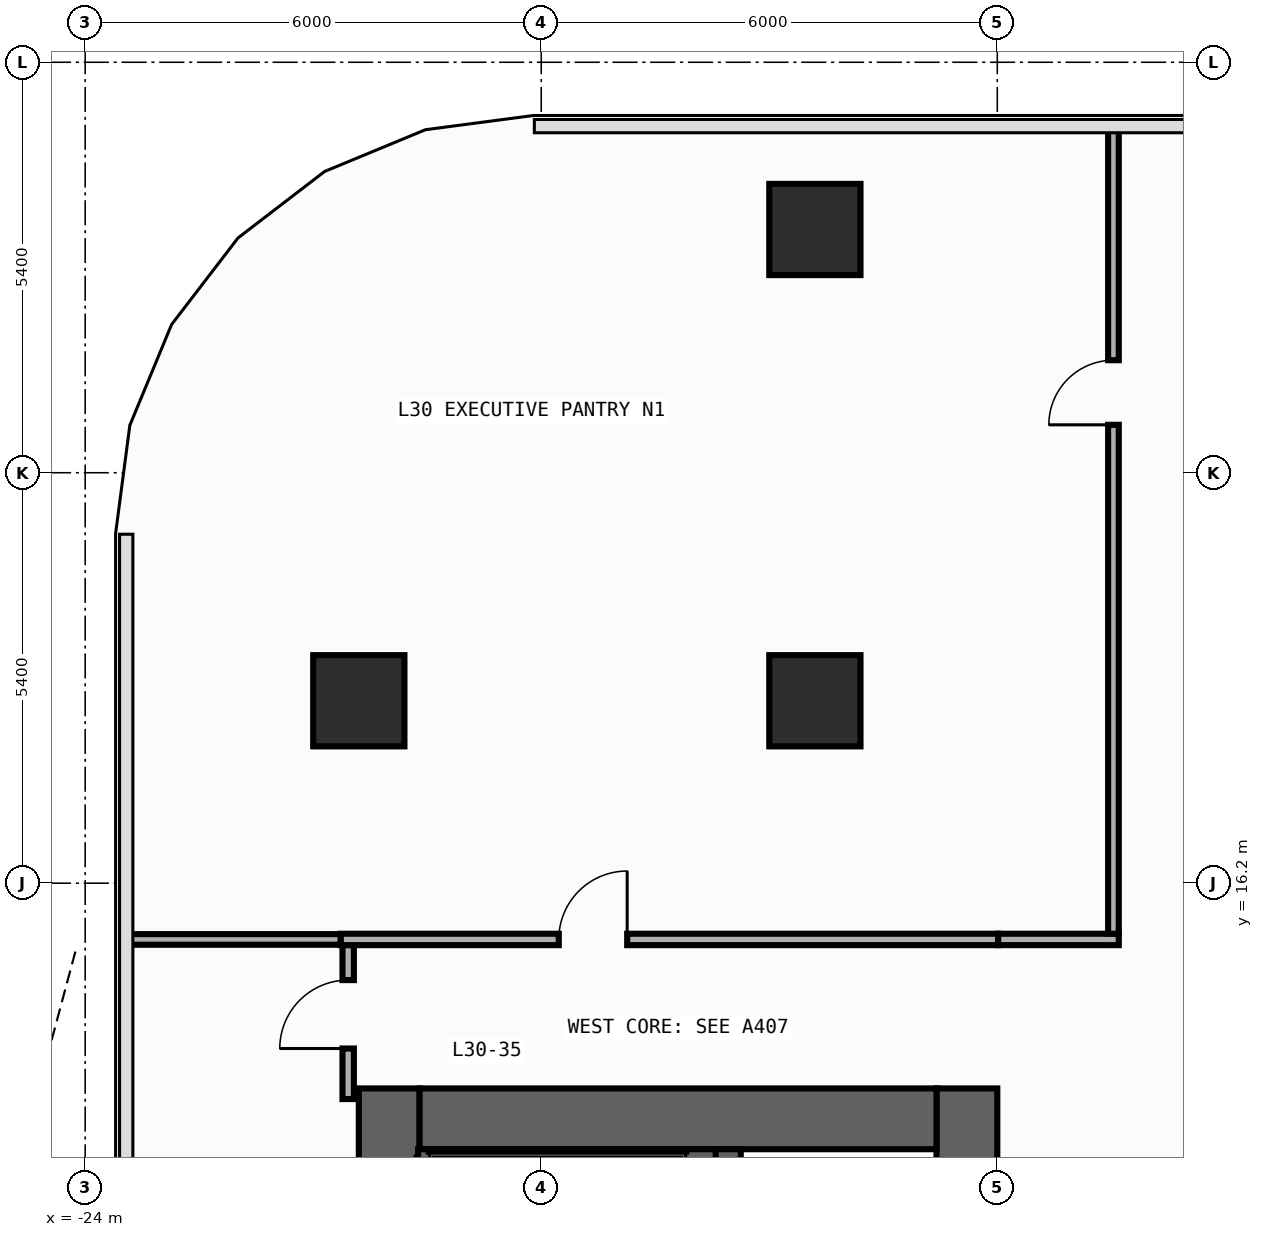
"""IFC4 building model, lengths in metres.
Left out: names, types, materials, properties, quantities, classifications, styles, units other than length and angle.
Written with IfcOpenShell. Run it as: python <this file> out.ifc"""

import sys

from ifc_helpers import new_model, si_unit, direction, frame, frame_2d, origin, origin_2d, place, context, subcontext, project, spatial, rectangle, extrude, element, fill, save


model = new_model("IFC4")
c1 = context("Model", 3, precision=1e-05, world=origin(), true_north=direction((0.0, 1.0)))
c2 = subcontext(c1, "Body", "Model", "MODEL_VIEW")
j1 = project(units=[si_unit("LENGTHUNIT", "METRE"), si_unit("PLANEANGLEUNIT", "RADIAN")], contexts=[c1])
p1 = place(None, origin())
s1 = spatial("IfcSite", under=j1, at=p1, CompositionType="ELEMENT")
p2 = place(p1, origin())
s2 = spatial("IfcBuilding", under=s1, at=p2, CompositionType="ELEMENT")
p3 = place(p2, frame((0.0, 0.0, 131.0)))
s3 = spatial("IfcBuildingStorey", under=s2, at=p3, CompositionType="ELEMENT", Elevation=131.0)
p4 = place(p3, frame((-20.0, -13.5, 0.0), z_axis=(0.0, 0.0, 1.0), x_axis=(0.0, 1.0, 0.0)))
e1 = element("IfcWall", 1, at=p4, inside=s3, PredefinedType="SHEAR", context=c2, shape_type="SweptSolid", body=[
    extrude(rectangle(XDim=27.0, YDim=0.8, at=frame_2d((13.5, 0.0))), origin(), (0.0, 0.0, 1.0), 3.94),
])
p5 = place(p3, frame((-12.4, -13.5, 0.0), z_axis=(0.0, 0.0, 1.0), x_axis=(0.0, 1.0, 0.0)))
e2 = element("IfcWall", 2, at=p5, inside=s3, PredefinedType="SHEAR", context=c2, shape_type="SweptSolid", body=[
    extrude(rectangle(XDim=27.0, YDim=0.8, at=frame_2d((13.5, 0.0))), origin(), (0.0, 0.0, 1.0), 3.94),
])
p6 = place(p5, frame((10.35, 0.0, 0.0)))
e3 = element("IfcOpeningElement", 3, at=p6, cuts=e2, PredefinedType="OPENING", context=c2, shape_type="SweptSolid", body=[
    extrude(rectangle(XDim=1.1, YDim=2.2, at=frame_2d((0.55, 1.1))), frame((0.0, 0.41, 0.0), z_axis=(0.0, -1.0, 0.0), x_axis=(1.0, 0.0, 0.0)), (0.0, 0.0, 1.0), 0.82),
])
p7 = place(p5, frame((7.15, 0.0, 0.0)))
e4 = element("IfcOpeningElement", 4, at=p7, cuts=e2, PredefinedType="OPENING", context=c2, shape_type="SweptSolid", body=[
    extrude(rectangle(XDim=1.1, YDim=2.2, at=frame_2d((0.55, 1.1))), frame((0.0, 0.41, 0.0), z_axis=(0.0, -1.0, 0.0), x_axis=(1.0, 0.0, 0.0)), (0.0, 0.0, 1.0), 0.82),
])
p8 = place(p5, frame((3.95, 0.0, 0.0)))
e5 = element("IfcOpeningElement", 5, at=p8, cuts=e2, PredefinedType="OPENING", context=c2, shape_type="SweptSolid", body=[
    extrude(rectangle(XDim=1.1, YDim=2.2, at=frame_2d((0.55, 1.1))), frame((0.0, 0.41, 0.0), z_axis=(0.0, -1.0, 0.0), x_axis=(1.0, 0.0, 0.0)), (0.0, 0.0, 1.0), 0.82),
])
p9 = place(p5, frame((15.175, 0.0, 0.0)))
e6 = element("IfcOpeningElement", 6, at=p9, cuts=e2, PredefinedType="OPENING", context=c2, shape_type="SweptSolid", body=[
    extrude(rectangle(XDim=0.85, YDim=2.1, at=frame_2d((0.425, 1.05))), frame((0.0, 0.41, 0.0), z_axis=(0.0, -1.0, 0.0), x_axis=(1.0, 0.0, 0.0)), (0.0, 0.0, 1.0), 0.82),
])
p10 = place(p5, frame((21.275, 0.0, 0.0)))
e7 = element("IfcOpeningElement", 7, at=p10, cuts=e2, PredefinedType="OPENING", context=c2, shape_type="SweptSolid", body=[
    extrude(rectangle(XDim=0.85, YDim=2.1, at=frame_2d((0.425, 1.05))), frame((0.0, 0.41, 0.0), z_axis=(0.0, -1.0, 0.0), x_axis=(1.0, 0.0, 0.0)), (0.0, 0.0, 1.0), 0.82),
])
p11 = place(p5, frame((12.725, 0.0, 0.0)))
e8 = element("IfcOpeningElement", 8, at=p11, cuts=e2, PredefinedType="OPENING", context=c2, shape_type="SweptSolid", body=[
    extrude(rectangle(XDim=1.15, YDim=2.2, at=frame_2d((0.575, 1.1))), frame((0.0, 0.41, 0.0), z_axis=(0.0, -1.0, 0.0), x_axis=(1.0, 0.0, 0.0)), (0.0, 0.0, 1.0), 0.82),
])
p12 = place(p5, frame((1.625, 0.0, 0.0)))
e9 = element("IfcOpeningElement", 9, at=p12, cuts=e2, PredefinedType="OPENING", context=c2, shape_type="SweptSolid", body=[
    extrude(rectangle(XDim=0.85, YDim=2.1, at=frame_2d((0.425, 1.05))), frame((0.0, 0.41, 0.0), z_axis=(0.0, -1.0, 0.0), x_axis=(1.0, 0.0, 0.0)), (0.0, 0.0, 1.0), 0.82),
])
p13 = place(p3, frame((-19.6, 13.1, 0.0), z_axis=(0.0, 0.0, 1.0), x_axis=(1.0, 0.0, 0.0)))
e10 = element("IfcWall", 10, at=p13, inside=s3, PredefinedType="SHEAR", context=c2, shape_type="SweptSolid", body=[
    extrude(rectangle(XDim=6.8, YDim=0.8, at=frame_2d((3.4, 0.0))), origin(), (0.0, 0.0, 1.0), 3.94),
])
p14 = place(p3, frame((-15.55, -12.7, 0.0), z_axis=(0.0, 0.0, 1.0), x_axis=(0.0, 1.0, 0.0)))
e11 = element("IfcWall", 11, at=p14, inside=s3, PredefinedType="SHEAR", context=c2, shape_type="SweptSolid", body=[
    extrude(rectangle(XDim=25.4, YDim=0.35, at=frame_2d((12.7, 0.0))), origin(), (0.0, 0.0, 1.0), 3.94),
])
p15 = place(p14, frame((11.925, 0.0, 0.0)))
e12 = element("IfcOpeningElement", 12, at=p15, cuts=e11, PredefinedType="OPENING", context=c2, shape_type="SweptSolid", body=[
    extrude(rectangle(XDim=1.15, YDim=2.2, at=frame_2d((0.575, 1.1))), frame((0.0, 0.185, 0.0), z_axis=(0.0, -1.0, 0.0), x_axis=(1.0, 0.0, 0.0)), (0.0, 0.0, 1.0), 0.37),
])
p16 = place(p14, frame((0.825, 0.0, 0.0)))
e13 = element("IfcOpeningElement", 13, at=p16, cuts=e11, PredefinedType="OPENING", context=c2, shape_type="SweptSolid", body=[
    extrude(rectangle(XDim=0.85, YDim=2.1, at=frame_2d((0.425, 1.05))), frame((0.0, 0.185, 0.0), z_axis=(0.0, -1.0, 0.0), x_axis=(1.0, 0.0, 0.0)), (0.0, 0.0, 1.0), 0.37),
])
p17 = place(p3, frame((-19.62, 12.59, 0.0), z_axis=(0.0, 0.0, 1.0), x_axis=(1.0, 0.0, 0.0)))
e14 = element("IfcWall", 14, at=p17, inside=s3, PredefinedType="SHEAR", context=c2, shape_type="SweptSolid", body=[
    extrude(rectangle(XDim=3.915, YDim=0.22, at=frame_2d((1.958, 0.0))), origin(), (0.0, 0.0, 1.0), 3.94),
])
for number, where, z_axis, x_axis in (
    (15, (-20.4, 18.6, 0.0), (0.0, 0.0, 1.0), (1.0, 0.0, 0.0)),
    (16, (-14.4, 18.6, 0.0), (0.0, 0.0, 1.0), (1.0, 0.0, 0.0)),
    (17, (-14.4, 24.8, 0.0), (0.0, 0.0, 1.0), (1.0, 0.0, 0.0)),
):
    element("IfcColumn", number, at=place(p3, frame(where, z_axis=z_axis, x_axis=x_axis)), inside=s3, PredefinedType="COLUMN", context=c2, shape_type="SweptSolid", body=[
        extrude(rectangle(XDim=1.2, YDim=1.2, at=origin_2d()), origin(), (0.0, 0.0, 1.0), 4.2),
    ])
p18 = place(p3, frame((-11.99, 15.46, 0.0), z_axis=(0.0, 0.0, 1.0), x_axis=(1.0, 0.0, 0.0)))
e18 = element("IfcWall", 18, at=p18, inside=s3, PredefinedType="PARTITIONING", context=c2, shape_type="SweptSolid", body=[
    extrude(rectangle(XDim=1.588, YDim=0.15, at=frame_2d((0.794, 0.0))), origin(), (0.0, 0.0, 1.0), 3.94),
])
p19 = place(p3, frame((-20.54, 13.36, 0.0), z_axis=(0.0, 0.0, 1.0), x_axis=(0.0, 1.0, 0.0)))
e19 = element("IfcWall", 19, at=p19, inside=s3, PredefinedType="PARTITIONING", context=c2, shape_type="SweptSolid", body=[
    extrude(rectangle(XDim=2.025, YDim=0.15, at=frame_2d((1.012, 0.0))), origin(), (0.0, 0.0, 1.0), 3.94),
])
p20 = place(p19, frame((0.665, 0.0, 0.0)))
e20 = element("IfcOpeningElement", 20, at=p20, cuts=e19, PredefinedType="OPENING", context=c2, shape_type="SweptSolid", body=[
    extrude(rectangle(XDim=0.9, YDim=2.15, at=frame_2d((0.45, 1.075))), frame((0.0, 0.085, 0.0), z_axis=(0.0, -1.0, 0.0), x_axis=(1.0, 0.0, 0.0)), (0.0, 0.0, 1.0), 0.17),
])
p21 = place(p3, frame((-20.64, 15.46, 0.0), z_axis=(0.0, 0.0, 1.0), x_axis=(1.0, 0.0, 0.0)))
e21 = element("IfcWall", 21, at=p21, inside=s3, PredefinedType="PARTITIONING", context=c2, shape_type="SweptSolid", body=[
    extrude(rectangle(XDim=8.65, YDim=0.15, at=frame_2d((4.325, 0.0))), origin(), (0.0, 0.0, 1.0), 3.94),
])
p22 = place(p21, frame((2.871, 0.0, 0.0)))
e22 = element("IfcOpeningElement", 22, at=p22, cuts=e21, PredefinedType="OPENING", context=c2, shape_type="SweptSolid", body=[
    extrude(rectangle(XDim=0.9, YDim=2.15, at=frame_2d((0.45, 1.075))), frame((0.0, 0.085, 0.0), z_axis=(0.0, -1.0, 0.0), x_axis=(1.0, 0.0, 0.0)), (0.0, 0.0, 1.0), 0.17),
])
p23 = place(p3, frame((-23.455, 15.46, 0.0), z_axis=(0.0, 0.0, 1.0), x_axis=(1.0, 0.0, 0.0)))
e23 = element("IfcWall", 23, at=p23, inside=s3, PredefinedType="PARTITIONING", context=c2, shape_type="SweptSolid", body=[
    extrude(rectangle(XDim=2.815, YDim=0.14, at=frame_2d((1.408, 0.0))), origin(), (0.0, 0.0, 1.0), 3.94),
])
p24 = place(p3, frame((-10.472, 15.535, 0.0), z_axis=(0.0, 0.0, 1.0), x_axis=(0.0, 1.0, 0.0)))
e24 = element("IfcWall", 24, at=p24, inside=s3, PredefinedType="PARTITIONING", context=c2, shape_type="SweptSolid", body=[
    extrude(rectangle(XDim=10.62, YDim=0.14, at=frame_2d((5.31, 0.0))), origin(), (0.0, 0.0, 1.0), 3.94),
])
p25 = place(p24, frame((6.695, 0.0, 0.0)))
e25 = element("IfcOpeningElement", 25, at=p25, cuts=e24, PredefinedType="OPENING", context=c2, shape_type="SweptSolid", body=[
    extrude(rectangle(XDim=0.85, YDim=2.1, at=frame_2d((0.425, 1.05))), frame((0.0, 0.08, 0.0), z_axis=(0.0, -1.0, 0.0), x_axis=(1.0, 0.0, 0.0)), (0.0, 0.0, 1.0), 0.16),
])
p26 = place(p20, origin())
e26 = element("IfcDoor", 26, at=p26, inside=s3, OperationType="SINGLE_SWING_LEFT", PredefinedType="DOOR", context=c2, shape_type="SweptSolid", body=[
    extrude(rectangle(XDim=0.9, YDim=2.15, at=frame_2d((0.45, 1.075))), frame((0.0, 0.025, 0.0), z_axis=(0.0, -1.0, 0.0), x_axis=(1.0, 0.0, 0.0)), (0.0, 0.0, 1.0), 0.05),
])
fill(e20, e26)
p27 = place(p22, origin())
e27 = element("IfcDoor", 27, at=p27, inside=s3, OperationType="SINGLE_SWING_RIGHT", PredefinedType="DOOR", context=c2, shape_type="SweptSolid", body=[
    extrude(rectangle(XDim=0.9, YDim=2.15, at=frame_2d((0.45, 1.075))), frame((0.0, 0.025, 0.0), z_axis=(0.0, -1.0, 0.0), x_axis=(1.0, 0.0, 0.0)), (0.0, 0.0, 1.0), 0.05),
])
fill(e22, e27)
p28 = place(p25, origin())
e28 = element("IfcDoor", 28, at=p28, inside=s3, OperationType="SINGLE_SWING_LEFT", PredefinedType="DOOR", context=c2, shape_type="SweptSolid", body=[
    extrude(rectangle(XDim=0.85, YDim=2.1, at=frame_2d((0.425, 1.05))), frame((0.0, 0.025, 0.0), z_axis=(0.0, -1.0, 0.0), x_axis=(1.0, 0.0, 0.0)), (0.0, 0.0, 1.0), 0.05),
])
fill(e25, e28)
save(model, sys.argv[1])
